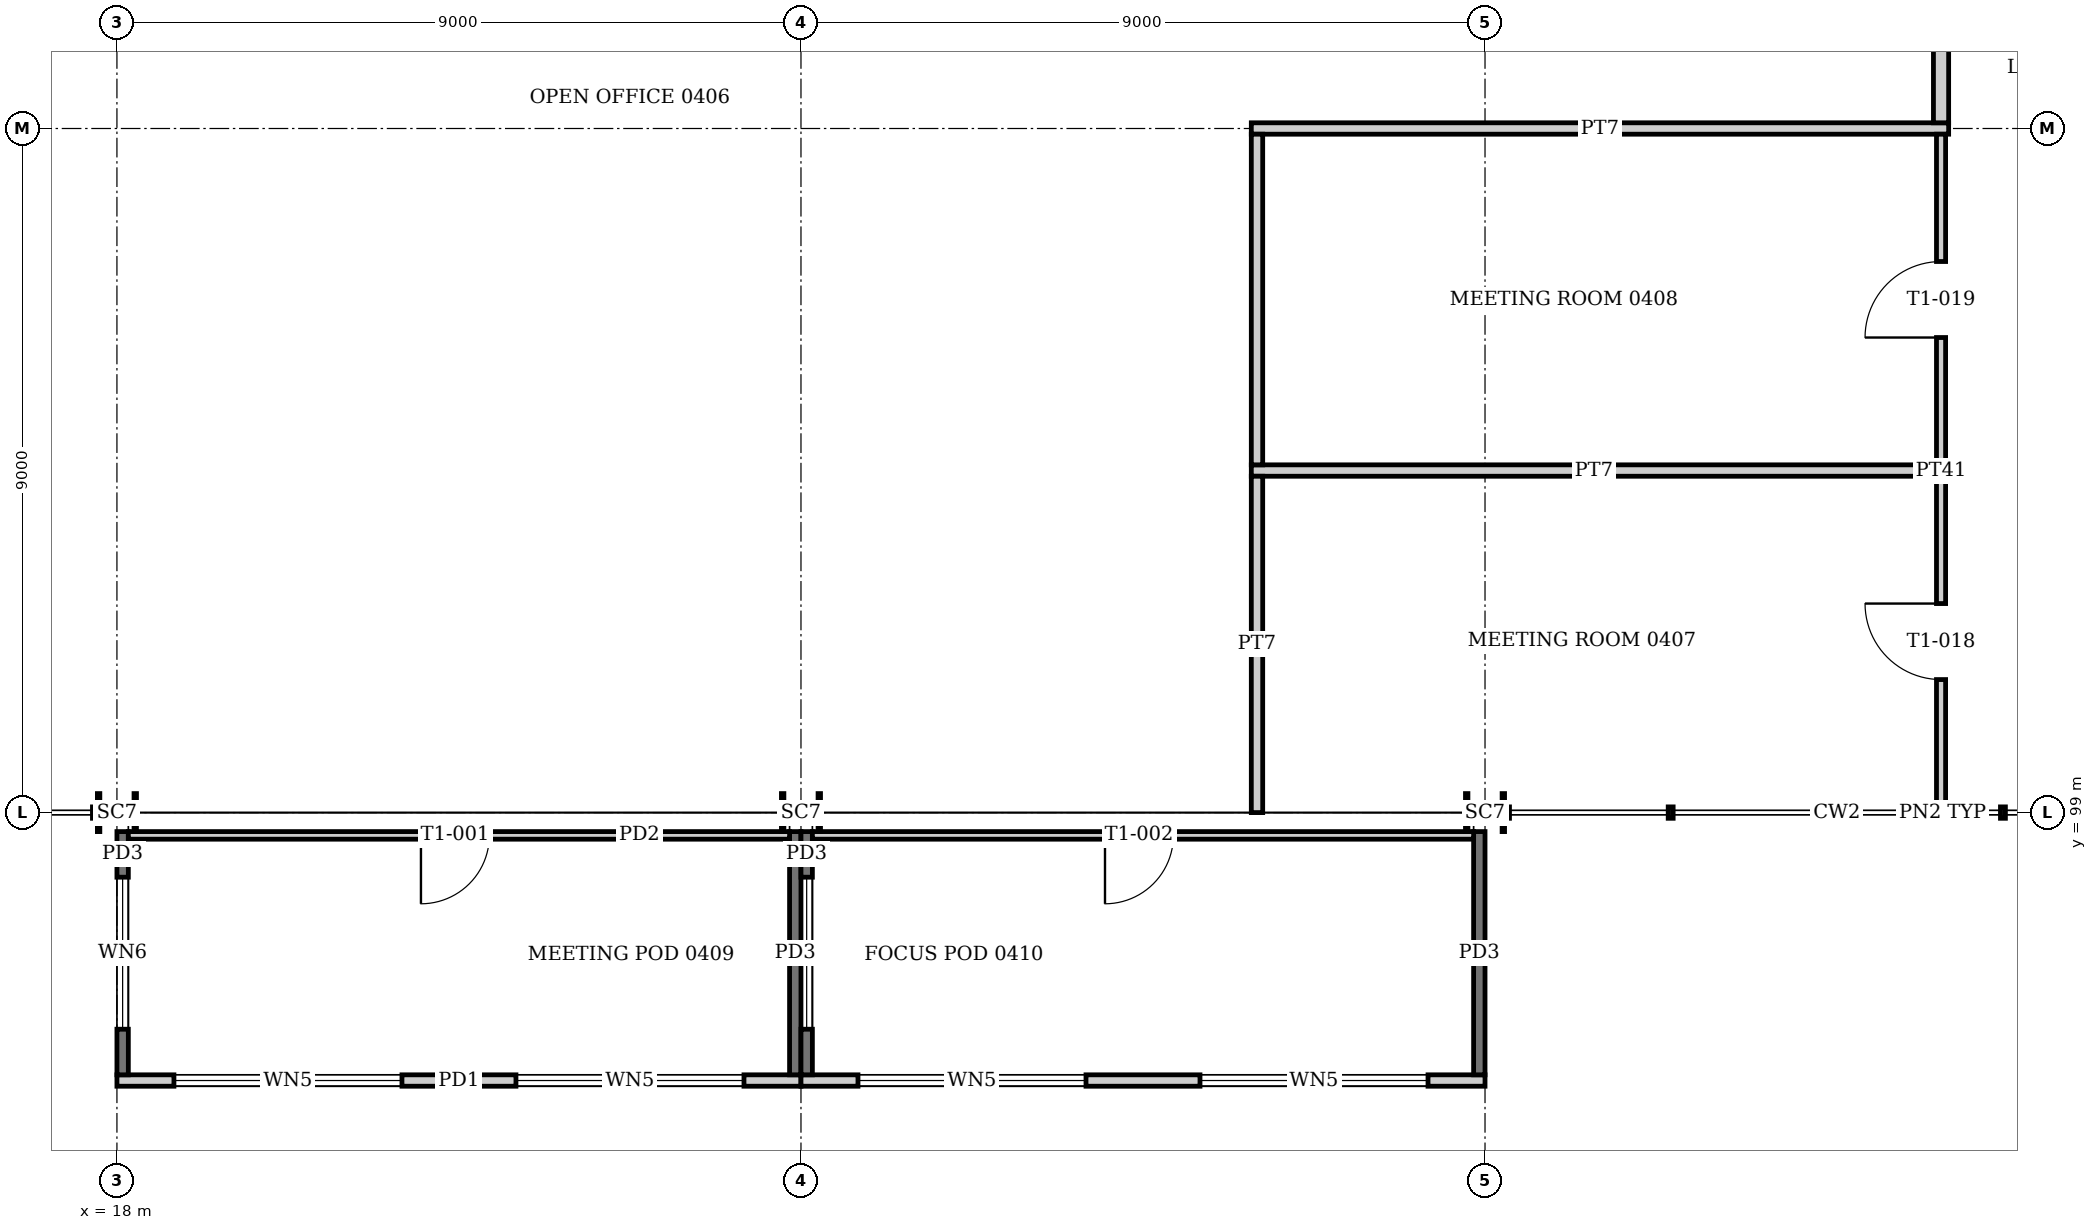
"""IFC4 building model, lengths in metres.
Left out: names, types, materials, properties, quantities, classifications, styles, units other than length and angle.
Written with IfcOpenShell. Run it as: python <this file> out.ifc"""

import sys

from ifc_helpers import new_model, si_unit, direction, frame, frame_2d, origin, origin_2d, place, context, subcontext, project, spatial, rectangle, i_section, extrude, element, fill, save


model = new_model("IFC4")
c1 = context("Model", 3, precision=1e-05, world=origin(), true_north=direction((0.0, 1.0)))
c2 = subcontext(c1, "Body", "Model", "MODEL_VIEW")
j1 = project(units=[si_unit("LENGTHUNIT", "METRE"), si_unit("PLANEANGLEUNIT", "RADIAN")], contexts=[c1])
p1 = place(None, origin())
s1 = spatial("IfcSite", under=j1, at=p1, CompositionType="ELEMENT")
p2 = place(p1, origin())
s2 = spatial("IfcBuilding", under=s1, at=p2, CompositionType="ELEMENT")
p3 = place(p2, frame((0.0, 0.0, 19.2)))
s3 = spatial("IfcBuildingStorey", under=s2, at=p3, CompositionType="ELEMENT", Elevation=19.2)
for number, where, z_axis, x_axis in (
    (1, (18.0, 99.0, 0.0), (0.0, 0.0, 1.0), (0.0, 1.0, 0.0)),
    (2, (27.0, 99.0, 0.0), (0.0, 0.0, 1.0), (0.0, 1.0, 0.0)),
    (3, (36.0, 99.0, 0.0), (0.0, 0.0, 1.0), (0.0, 1.0, 0.0)),
):
    element("IfcColumn", number, at=place(p3, frame(where, z_axis=z_axis, x_axis=x_axis)), inside=s3, PredefinedType="COLUMN", context=c2, shape_type="SweptSolid", body=[
        extrude(i_section(OverallWidth=0.5, OverallDepth=0.514, WebThickness=0.025, FlangeThickness=0.032, at=origin_2d()), origin(), (0.0, 0.0, 1.0), 4.0),
    ])
p4 = place(p3, frame((18.0, 95.475, 0.0), z_axis=(0.0, 0.0, 1.0), x_axis=(1.0, 0.0, 0.0)))
e4 = element("IfcWall", 4, at=p4, inside=s3, PredefinedType="SOLIDWALL", context=c2, shape_type="SweptSolid", body=[
    extrude(rectangle(XDim=9.0, YDim=0.15, at=frame_2d((4.5, 0.0))), origin(), (0.0, 0.0, 1.0), 2.6),
])
p5 = place(p4, frame((0.75, 0.0, 0.9)))
e5 = element("IfcOpeningElement", 5, at=p5, cuts=e4, PredefinedType="OPENING", context=c2, shape_type="SweptSolid", body=[
    extrude(rectangle(XDim=3.0, YDim=1.4, at=frame_2d((1.5, 0.7))), frame((0.0, 0.085, 0.0), z_axis=(0.0, -1.0, 0.0), x_axis=(1.0, 0.0, 0.0)), (0.0, 0.0, 1.0), 0.17),
])
p6 = place(p4, frame((5.25, 0.0, 0.9)))
e6 = element("IfcOpeningElement", 6, at=p6, cuts=e4, PredefinedType="OPENING", context=c2, shape_type="SweptSolid", body=[
    extrude(rectangle(XDim=3.0, YDim=1.4, at=frame_2d((1.5, 0.7))), frame((0.0, 0.085, 0.0), z_axis=(0.0, -1.0, 0.0), x_axis=(1.0, 0.0, 0.0)), (0.0, 0.0, 1.0), 0.17),
])
p7 = place(p3, frame((18.075, 95.55, -0.15), z_axis=(0.0, 0.0, 1.0), x_axis=(0.0, 1.0, 0.0)))
e7 = element("IfcWall", 7, at=p7, inside=s3, PredefinedType="SOLIDWALL", context=c2, shape_type="SweptSolid", body=[
    extrude(rectangle(XDim=3.2, YDim=0.15, at=frame_2d((1.6, 0.0))), origin(), (0.0, 0.0, 1.0), 2.75),
])
p8 = place(p7, frame((0.6, 0.0, 1.05)))
e8 = element("IfcOpeningElement", 8, at=p8, cuts=e7, PredefinedType="OPENING", context=c2, shape_type="SweptSolid", body=[
    extrude(rectangle(XDim=2.0, YDim=1.4, at=frame_2d((1.0, 0.7))), frame((0.0, 0.085, 0.0), z_axis=(0.0, -1.0, 0.0), x_axis=(1.0, 0.0, 0.0)), (0.0, 0.0, 1.0), 0.17),
])
p9 = place(p3, frame((26.925, 95.55, -0.15), z_axis=(0.0, 0.0, 1.0), x_axis=(0.0, 1.0, 0.0)))
e9 = element("IfcWall", 9, at=p9, inside=s3, PredefinedType="SOLIDWALL", context=c2, shape_type="SweptSolid", body=[
    extrude(rectangle(XDim=3.2, YDim=0.15, at=frame_2d((1.6, 0.0))), origin(), (0.0, 0.0, 1.0), 2.75),
])
p10 = place(p3, frame((18.15, 98.7, 0.0), z_axis=(0.0, 0.0, 1.0), x_axis=(1.0, 0.0, 0.0)))
e10 = element("IfcWall", 10, at=p10, inside=s3, PredefinedType="PARTITIONING", context=c2, shape_type="SweptSolid", body=[
    extrude(rectangle(XDim=8.7, YDim=0.1, at=frame_2d((4.35, 0.0))), origin(), (0.0, 0.0, 1.0), 2.6),
])
p11 = place(p10, frame((3.85, 0.0, 0.0)))
e11 = element("IfcOpeningElement", 11, at=p11, cuts=e10, PredefinedType="OPENING", context=c2, shape_type="SweptSolid", body=[
    extrude(rectangle(XDim=0.9, YDim=2.1, at=frame_2d((0.45, 1.05))), frame((0.0, 0.06, 0.0), z_axis=(0.0, -1.0, 0.0), x_axis=(1.0, 0.0, 0.0)), (0.0, 0.0, 1.0), 0.12),
])
p12 = place(p3, frame((27.0, 95.475, 0.0), z_axis=(0.0, 0.0, 1.0), x_axis=(1.0, 0.0, 0.0)))
e12 = element("IfcWall", 12, at=p12, inside=s3, PredefinedType="SOLIDWALL", context=c2, shape_type="SweptSolid", body=[
    extrude(rectangle(XDim=9.0, YDim=0.15, at=frame_2d((4.5, 0.0))), origin(), (0.0, 0.0, 1.0), 2.6),
])
p13 = place(p12, frame((0.75, 0.0, 0.9)))
e13 = element("IfcOpeningElement", 13, at=p13, cuts=e12, PredefinedType="OPENING", context=c2, shape_type="SweptSolid", body=[
    extrude(rectangle(XDim=3.0, YDim=1.4, at=frame_2d((1.5, 0.7))), frame((0.0, 0.085, 0.0), z_axis=(0.0, -1.0, 0.0), x_axis=(1.0, 0.0, 0.0)), (0.0, 0.0, 1.0), 0.17),
])
p14 = place(p12, frame((5.25, 0.0, 0.9)))
e14 = element("IfcOpeningElement", 14, at=p14, cuts=e12, PredefinedType="OPENING", context=c2, shape_type="SweptSolid", body=[
    extrude(rectangle(XDim=3.0, YDim=1.4, at=frame_2d((1.5, 0.7))), frame((0.0, 0.085, 0.0), z_axis=(0.0, -1.0, 0.0), x_axis=(1.0, 0.0, 0.0)), (0.0, 0.0, 1.0), 0.17),
])
p15 = place(p3, frame((27.075, 95.55, -0.15), z_axis=(0.0, 0.0, 1.0), x_axis=(0.0, 1.0, 0.0)))
e15 = element("IfcWall", 15, at=p15, inside=s3, PredefinedType="SOLIDWALL", context=c2, shape_type="SweptSolid", body=[
    extrude(rectangle(XDim=3.2, YDim=0.15, at=frame_2d((1.6, 0.0))), origin(), (0.0, 0.0, 1.0), 2.75),
])
p16 = place(p15, frame((0.6, 0.0, 1.05)))
e16 = element("IfcOpeningElement", 16, at=p16, cuts=e15, PredefinedType="OPENING", context=c2, shape_type="SweptSolid", body=[
    extrude(rectangle(XDim=2.0, YDim=1.4, at=frame_2d((1.0, 0.7))), frame((0.0, 0.085, 0.0), z_axis=(0.0, -1.0, 0.0), x_axis=(1.0, 0.0, 0.0)), (0.0, 0.0, 1.0), 0.17),
])
p17 = place(p3, frame((35.925, 95.55, -0.15), z_axis=(0.0, 0.0, 1.0), x_axis=(0.0, 1.0, 0.0)))
e17 = element("IfcWall", 17, at=p17, inside=s3, PredefinedType="SOLIDWALL", context=c2, shape_type="SweptSolid", body=[
    extrude(rectangle(XDim=3.2, YDim=0.15, at=frame_2d((1.6, 0.0))), origin(), (0.0, 0.0, 1.0), 2.75),
])
p18 = place(p3, frame((27.15, 98.7, 0.0), z_axis=(0.0, 0.0, 1.0), x_axis=(1.0, 0.0, 0.0)))
e18 = element("IfcWall", 18, at=p18, inside=s3, PredefinedType="PARTITIONING", context=c2, shape_type="SweptSolid", body=[
    extrude(rectangle(XDim=8.7, YDim=0.1, at=frame_2d((4.35, 0.0))), origin(), (0.0, 0.0, 1.0), 2.6),
])
p19 = place(p18, frame((3.85, 0.0, 0.0)))
e19 = element("IfcOpeningElement", 19, at=p19, cuts=e18, PredefinedType="OPENING", context=c2, shape_type="SweptSolid", body=[
    extrude(rectangle(XDim=0.9, YDim=2.1, at=frame_2d((0.45, 1.05))), frame((0.0, 0.06, 0.0), z_axis=(0.0, -1.0, 0.0), x_axis=(1.0, 0.0, 0.0)), (0.0, 0.0, 1.0), 0.12),
])
p20 = place(p3, frame((32.925, 103.5, 0.0), z_axis=(0.0, 0.0, 1.0), x_axis=(1.0, 0.0, 0.0)))
e20 = element("IfcWall", 20, at=p20, inside=s3, PredefinedType="PARTITIONING", context=c2, shape_type="SweptSolid", body=[
    extrude(rectangle(XDim=9.015, YDim=0.15, at=frame_2d((4.507, 0.0))), origin(), (0.0, 0.0, 1.0), 3.05),
])
p21 = place(p3, frame((32.925, 108.0, 0.0), z_axis=(0.0, 0.0, 1.0), x_axis=(1.0, 0.0, 0.0)))
e21 = element("IfcWall", 21, at=p21, inside=s3, PredefinedType="PARTITIONING", context=c2, shape_type="SweptSolid", body=[
    extrude(rectangle(XDim=9.175, YDim=0.15, at=frame_2d((4.587, 0.0))), origin(), (0.0, 0.0, 1.0), 3.05),
])
p22 = place(p3, frame((33.0, 99.0, 0.0), z_axis=(0.0, 0.0, 1.0), x_axis=(0.0, 1.0, 0.0)))
e22 = element("IfcWall", 22, at=p22, inside=s3, PredefinedType="PARTITIONING", context=c2, shape_type="SweptSolid", body=[
    extrude(rectangle(XDim=4.425, YDim=0.15, at=frame_2d((2.212, 0.0))), origin(), (0.0, 0.0, 1.0), 3.04),
])
p23 = place(p3, frame((33.0, 103.575, 0.0), z_axis=(0.0, 0.0, 1.0), x_axis=(0.0, 1.0, 0.0)))
e23 = element("IfcWall", 23, at=p23, inside=s3, PredefinedType="PARTITIONING", context=c2, shape_type="SweptSolid", body=[
    extrude(rectangle(XDim=4.35, YDim=0.15, at=frame_2d((2.175, 0.0))), origin(), (0.0, 0.0, 1.0), 3.85),
])
p24 = place(p3, frame((42.0, 99.075, 0.0), z_axis=(0.0, 0.0, 1.0), x_axis=(0.0, 1.0, 0.0)))
e24 = element("IfcWall", 24, at=p24, inside=s3, PredefinedType="PARTITIONING", context=c2, shape_type="SweptSolid", body=[
    extrude(rectangle(XDim=8.85, YDim=0.12, at=frame_2d((4.425, 0.0))), origin(), (0.0, 0.0, 1.0), 3.85),
])
p25 = place(p24, frame((1.675, 0.0, 0.0)))
e25 = element("IfcOpeningElement", 25, at=p25, cuts=e24, PredefinedType="OPENING", context=c2, shape_type="SweptSolid", body=[
    extrude(rectangle(XDim=1.0, YDim=2.1, at=frame_2d((0.5, 1.05))), frame((0.0, 0.07, 0.0), z_axis=(0.0, -1.0, 0.0), x_axis=(1.0, 0.0, 0.0)), (0.0, 0.0, 1.0), 0.14),
])
p26 = place(p24, frame((6.175, 0.0, 0.0)))
e26 = element("IfcOpeningElement", 26, at=p26, cuts=e24, PredefinedType="OPENING", context=c2, shape_type="SweptSolid", body=[
    extrude(rectangle(XDim=1.0, YDim=2.1, at=frame_2d((0.5, 1.05))), frame((0.0, 0.07, 0.0), z_axis=(0.0, -1.0, 0.0), x_axis=(1.0, 0.0, 0.0)), (0.0, 0.0, 1.0), 0.14),
])
p27 = place(p3, frame((42.0, 108.075, 0.0), z_axis=(0.0, 0.0, 1.0), x_axis=(0.0, 1.0, 0.0)))
e27 = element("IfcWall", 27, at=p27, inside=s3, PredefinedType="PARTITIONING", context=c2, shape_type="SweptSolid", body=[
    extrude(rectangle(XDim=8.835, YDim=0.2, at=frame_2d((4.417, 0.0))), origin(), (0.0, 0.0, 1.0), 3.85),
])
p28 = place(p27, frame((3.525, 0.0, 0.0)))
e28 = element("IfcOpeningElement", 28, at=p28, cuts=e27, PredefinedType="OPENING", context=c2, shape_type="SweptSolid", body=[
    extrude(rectangle(XDim=1.8, YDim=2.1, at=frame_2d((0.9, 1.05))), frame((0.0, 0.11, 0.0), z_axis=(0.0, -1.0, 0.0), x_axis=(1.0, 0.0, 0.0)), (0.0, 0.0, 1.0), 0.22),
])
p29 = place(p5, origin())
e29 = element("IfcWindow", 29, at=p29, inside=s3, PartitioningType="SINGLE_PANEL", PredefinedType="WINDOW", context=c2, shape_type="SweptSolid", body=[
    extrude(rectangle(XDim=3.0, YDim=1.4, at=frame_2d((1.5, 0.7))), frame((0.0, 0.03, 0.0), z_axis=(0.0, -1.0, 0.0), x_axis=(1.0, 0.0, 0.0)), (0.0, 0.0, 1.0), 0.06),
])
fill(e5, e29)
p30 = place(p6, origin())
e30 = element("IfcWindow", 30, at=p30, inside=s3, PartitioningType="SINGLE_PANEL", PredefinedType="WINDOW", context=c2, shape_type="SweptSolid", body=[
    extrude(rectangle(XDim=3.0, YDim=1.4, at=frame_2d((1.5, 0.7))), frame((0.0, 0.03, 0.0), z_axis=(0.0, -1.0, 0.0), x_axis=(1.0, 0.0, 0.0)), (0.0, 0.0, 1.0), 0.06),
])
fill(e6, e30)
p31 = place(p8, origin())
e31 = element("IfcWindow", 31, at=p31, inside=s3, PartitioningType="SINGLE_PANEL", PredefinedType="WINDOW", context=c2, shape_type="SweptSolid", body=[
    extrude(rectangle(XDim=2.0, YDim=1.4, at=frame_2d((1.0, 0.7))), frame((0.0, 0.03, 0.0), z_axis=(0.0, -1.0, 0.0), x_axis=(1.0, 0.0, 0.0)), (0.0, 0.0, 1.0), 0.06),
])
fill(e8, e31)
p32 = place(p11, frame((0.9, 0.0, 0.0), z_axis=(0.0, 0.0, 1.0), x_axis=(-1.0, 0.0, 0.0)))
e32 = element("IfcDoor", 32, at=p32, inside=s3, OperationType="SINGLE_SWING_RIGHT", PredefinedType="DOOR", context=c2, shape_type="SweptSolid", body=[
    extrude(rectangle(XDim=0.9, YDim=2.1, at=frame_2d((0.45, 1.05))), frame((0.0, 0.025, 0.0), z_axis=(0.0, -1.0, 0.0), x_axis=(1.0, 0.0, 0.0)), (0.0, 0.0, 1.0), 0.05),
])
fill(e11, e32)
p33 = place(p13, origin())
e33 = element("IfcWindow", 33, at=p33, inside=s3, PartitioningType="SINGLE_PANEL", PredefinedType="WINDOW", context=c2, shape_type="SweptSolid", body=[
    extrude(rectangle(XDim=3.0, YDim=1.4, at=frame_2d((1.5, 0.7))), frame((0.0, 0.03, 0.0), z_axis=(0.0, -1.0, 0.0), x_axis=(1.0, 0.0, 0.0)), (0.0, 0.0, 1.0), 0.06),
])
fill(e13, e33)
p34 = place(p14, origin())
e34 = element("IfcWindow", 34, at=p34, inside=s3, PartitioningType="SINGLE_PANEL", PredefinedType="WINDOW", context=c2, shape_type="SweptSolid", body=[
    extrude(rectangle(XDim=3.0, YDim=1.4, at=frame_2d((1.5, 0.7))), frame((0.0, 0.03, 0.0), z_axis=(0.0, -1.0, 0.0), x_axis=(1.0, 0.0, 0.0)), (0.0, 0.0, 1.0), 0.06),
])
fill(e14, e34)
p35 = place(p16, origin())
e35 = element("IfcWindow", 35, at=p35, inside=s3, PartitioningType="SINGLE_PANEL", PredefinedType="WINDOW", context=c2, shape_type="SweptSolid", body=[
    extrude(rectangle(XDim=2.0, YDim=1.4, at=frame_2d((1.0, 0.7))), frame((0.0, 0.03, 0.0), z_axis=(0.0, -1.0, 0.0), x_axis=(1.0, 0.0, 0.0)), (0.0, 0.0, 1.0), 0.06),
])
fill(e16, e35)
p36 = place(p19, frame((0.9, 0.0, 0.0), z_axis=(0.0, 0.0, 1.0), x_axis=(-1.0, 0.0, 0.0)))
e36 = element("IfcDoor", 36, at=p36, inside=s3, OperationType="SINGLE_SWING_RIGHT", PredefinedType="DOOR", context=c2, shape_type="SweptSolid", body=[
    extrude(rectangle(XDim=0.9, YDim=2.1, at=frame_2d((0.45, 1.05))), frame((0.0, 0.025, 0.0), z_axis=(0.0, -1.0, 0.0), x_axis=(1.0, 0.0, 0.0)), (0.0, 0.0, 1.0), 0.05),
])
fill(e19, e36)
p37 = place(p25, origin())
e37 = element("IfcDoor", 37, at=p37, inside=s3, OperationType="SINGLE_SWING_RIGHT", PredefinedType="DOOR", context=c2, shape_type="SweptSolid", body=[
    extrude(rectangle(XDim=1.0, YDim=2.1, at=frame_2d((0.5, 1.05))), frame((0.0, 0.025, 0.0), z_axis=(0.0, -1.0, 0.0), x_axis=(1.0, 0.0, 0.0)), (0.0, 0.0, 1.0), 0.05),
])
fill(e25, e37)
p38 = place(p26, origin())
e38 = element("IfcDoor", 38, at=p38, inside=s3, OperationType="SINGLE_SWING_LEFT", PredefinedType="DOOR", context=c2, shape_type="SweptSolid", body=[
    extrude(rectangle(XDim=1.0, YDim=2.1, at=frame_2d((0.5, 1.05))), frame((0.0, 0.025, 0.0), z_axis=(0.0, -1.0, 0.0), x_axis=(1.0, 0.0, 0.0)), (0.0, 0.0, 1.0), 0.05),
])
fill(e26, e38)
save(model, sys.argv[1])
